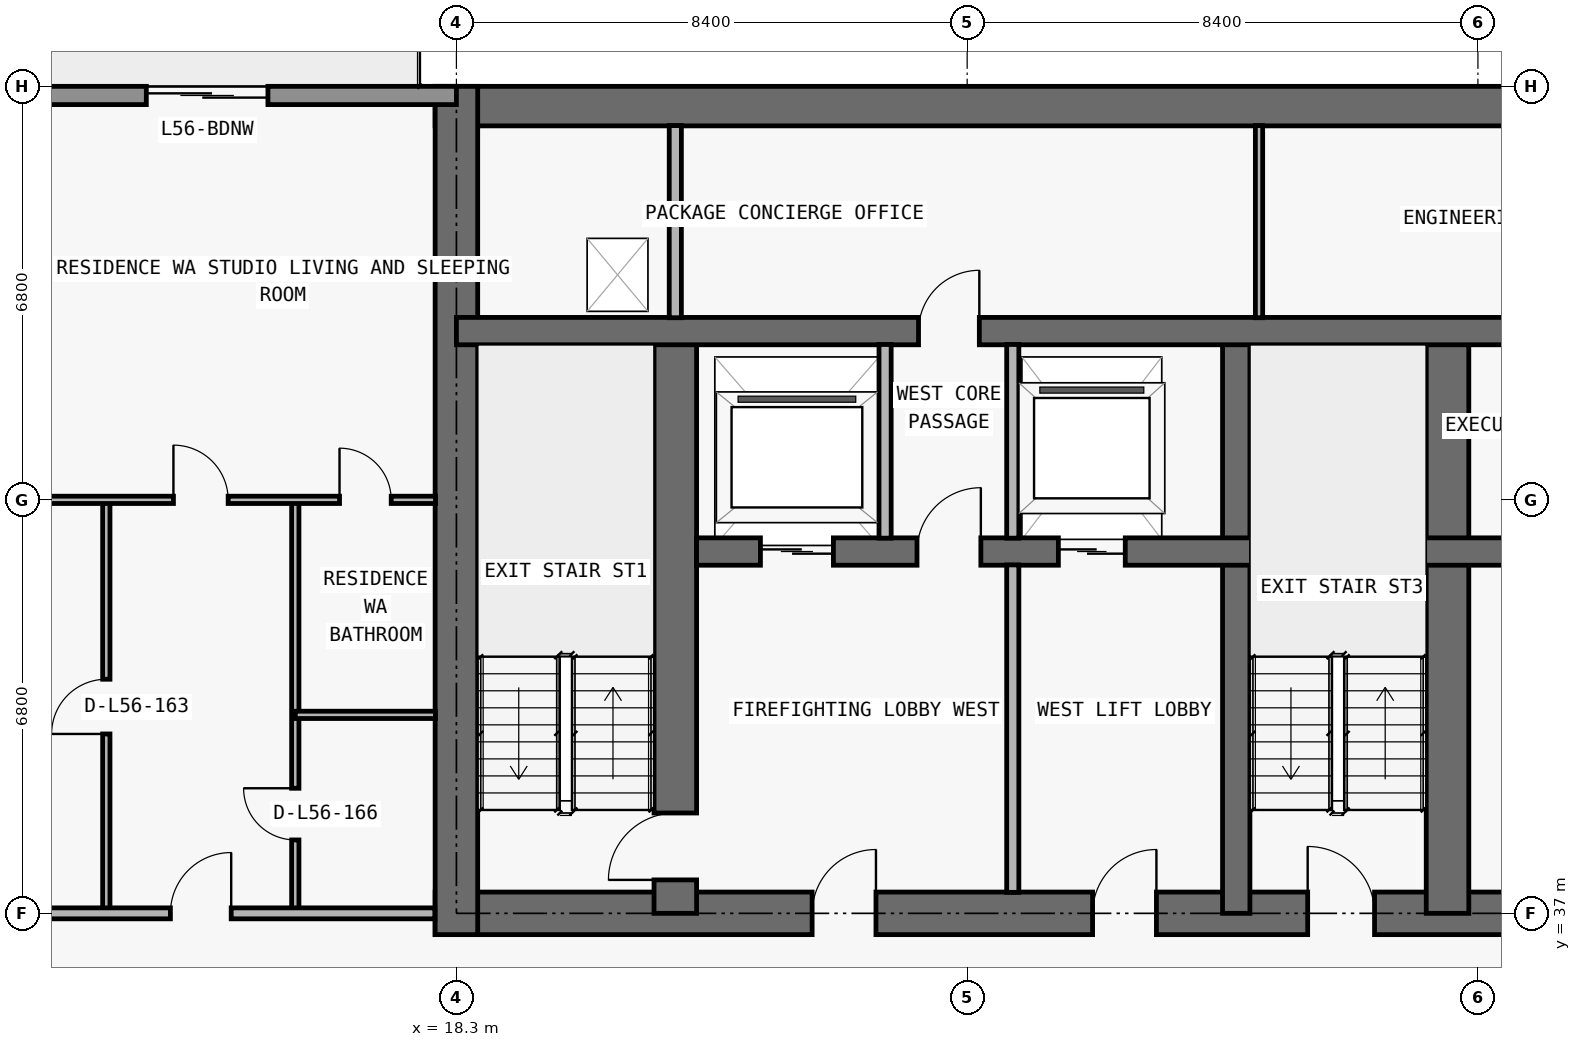
"""IFC4 building model, lengths in metres.
Left out: names, types, materials, properties, quantities, classifications, styles, units other than length and angle.
Written with IfcOpenShell. Run it as: python <this file> out.ifc"""

import sys

from ifc_helpers import new_model, si_unit, direction, frame, frame_2d, origin, place, context, subcontext, project, spatial, rectangle, extrude, element, fill, save


model = new_model("IFC4")
c1 = context("Model", 3, precision=1e-05, world=origin(), true_north=direction((0.0, 1.0)))
c2 = subcontext(c1, "Body", "Model", "MODEL_VIEW")
j1 = project(units=[si_unit("LENGTHUNIT", "METRE"), si_unit("PLANEANGLEUNIT", "RADIAN")], contexts=[c1])
p1 = place(None, origin())
s1 = spatial("IfcSite", under=j1, at=p1, CompositionType="ELEMENT")
p2 = place(p1, origin())
s2 = spatial("IfcBuilding", under=s1, at=p2, CompositionType="ELEMENT")
p3 = place(p2, frame((0.0, 0.0, 201.6)))
s3 = spatial("IfcBuildingStorey", under=s2, at=p3, CompositionType="ELEMENT", Elevation=201.6)
p4 = place(p3, frame((17.95, 37.0, 0.0), z_axis=(0.0, 0.0, 1.0), x_axis=(1.0, 0.0, 0.0)))
e1 = element("IfcWall", 1, at=p4, inside=s3, PredefinedType="SHEAR", context=c2, shape_type="SweptSolid", body=[
    extrude(rectangle(XDim=41.9, YDim=0.7, at=frame_2d((20.95, 0.0))), origin(), (0.0, 0.0, 1.0), 3.05),
])
p5 = place(p4, frame((14.35, 0.0, 0.0)))
e2 = element("IfcOpeningElement", 2, at=p5, cuts=e1, PredefinedType="OPENING", context=c2, shape_type="SweptSolid", body=[
    extrude(rectangle(XDim=1.1, YDim=2.15, at=frame_2d((0.55, 1.075))), frame((0.0, 0.36, 0.0), z_axis=(0.0, -1.0, 0.0), x_axis=(1.0, 0.0, 0.0)), (0.0, 0.0, 1.0), 0.72),
])
p6 = place(p4, frame((6.2, 0.0, 0.0)))
e3 = element("IfcOpeningElement", 3, at=p6, cuts=e1, PredefinedType="OPENING", context=c2, shape_type="SweptSolid", body=[
    extrude(rectangle(XDim=1.05, YDim=2.15, at=frame_2d((0.525, 1.075))), frame((0.0, 0.36, 0.0), z_axis=(0.0, -1.0, 0.0), x_axis=(1.0, 0.0, 0.0)), (0.0, 0.0, 1.0), 0.72),
])
p7 = place(p4, frame((34.7, 0.0, 0.0)))
e4 = element("IfcOpeningElement", 4, at=p7, cuts=e1, PredefinedType="OPENING", context=c2, shape_type="SweptSolid", body=[
    extrude(rectangle(XDim=1.05, YDim=2.15, at=frame_2d((0.525, 1.075))), frame((0.0, 0.36, 0.0), z_axis=(0.0, -1.0, 0.0), x_axis=(1.0, 0.0, 0.0)), (0.0, 0.0, 1.0), 0.72),
])
p8 = place(p4, frame((10.812, 0.0, 0.0)))
e5 = element("IfcOpeningElement", 5, at=p8, cuts=e1, PredefinedType="OPENING", context=c2, shape_type="SweptSolid", body=[
    extrude(rectangle(XDim=1.05, YDim=2.15, at=frame_2d((0.525, 1.075))), frame((0.0, 0.36, 0.0), z_axis=(0.0, -1.0, 0.0), x_axis=(1.0, 0.0, 0.0)), (0.0, 0.0, 1.0), 0.72),
])
p9 = place(p4, frame((24.05, 0.0, 0.0)))
e6 = element("IfcOpeningElement", 6, at=p9, cuts=e1, PredefinedType="OPENING", context=c2, shape_type="SweptSolid", body=[
    extrude(rectangle(XDim=1.05, YDim=2.15, at=frame_2d((0.525, 1.075))), frame((0.0, 0.36, 0.0), z_axis=(0.0, -1.0, 0.0), x_axis=(1.0, 0.0, 0.0)), (0.0, 0.0, 1.0), 0.72),
])
p10 = place(p3, frame((17.95, 50.275, 0.0), z_axis=(0.0, 0.0, 1.0), x_axis=(1.0, 0.0, 0.0)))
e7 = element("IfcWall", 7, at=p10, inside=s3, PredefinedType="SHEAR", context=c2, shape_type="SweptSolid", body=[
    extrude(rectangle(XDim=41.9, YDim=0.65, at=frame_2d((20.95, 0.0))), origin(), (0.0, 0.0, 1.0), 3.05),
])
p11 = place(p3, frame((18.3, 36.65, 0.0), z_axis=(0.0, 0.0, 1.0), x_axis=(0.0, 1.0, 0.0)))
e8 = element("IfcWall", 8, at=p11, inside=s3, PredefinedType="SHEAR", context=c2, shape_type="SweptSolid", body=[
    extrude(rectangle(XDim=13.95, YDim=0.7, at=frame_2d((6.975, 0.0))), origin(), (0.0, 0.0, 1.0), 3.05),
])
p12 = place(p3, frame((21.9, 37.0, 0.0), z_axis=(0.0, 0.0, 1.0), x_axis=(0.0, 1.0, 0.0)))
e9 = element("IfcWall", 9, at=p12, inside=s3, PredefinedType="SHEAR", context=c2, shape_type="SweptSolid", body=[
    extrude(rectangle(XDim=9.575, YDim=0.7, at=frame_2d((4.788, 0.0))), origin(), (0.0, 0.0, 1.0), 3.05),
])
p13 = place(p12, frame((0.55, 0.0, 0.0)))
e10 = element("IfcOpeningElement", 10, at=p13, cuts=e9, PredefinedType="OPENING", context=c2, shape_type="SweptSolid", body=[
    extrude(rectangle(XDim=1.1, YDim=2.15, at=frame_2d((0.55, 1.075))), frame((0.0, 0.36, 0.0), z_axis=(0.0, -1.0, 0.0), x_axis=(1.0, 0.0, 0.0)), (0.0, 0.0, 1.0), 0.72),
])
p14 = place(p3, frame((31.125, 37.0, 0.0), z_axis=(0.0, 0.0, 1.0), x_axis=(0.0, 1.0, 0.0)))
e11 = element("IfcWall", 11, at=p14, inside=s3, PredefinedType="SHEAR", context=c2, shape_type="SweptSolid", body=[
    extrude(rectangle(XDim=9.575, YDim=0.45, at=frame_2d((4.788, 0.0))), origin(), (0.0, 0.0, 1.0), 3.05),
])
p15 = place(p3, frame((34.6, 37.0, 0.0), z_axis=(0.0, 0.0, 1.0), x_axis=(0.0, 1.0, 0.0)))
e12 = element("IfcWall", 12, at=p15, inside=s3, PredefinedType="SHEAR", context=c2, shape_type="SweptSolid", body=[
    extrude(rectangle(XDim=9.575, YDim=0.7, at=frame_2d((4.788, 0.0))), origin(), (0.0, 0.0, 1.0), 3.05),
])
p16 = place(p3, frame((22.25, 42.95, 0.0), z_axis=(0.0, 0.0, 1.0), x_axis=(1.0, 0.0, 0.0)))
e13 = element("IfcWall", 13, at=p16, inside=s3, PredefinedType="SHEAR", context=c2, shape_type="SweptSolid", body=[
    extrude(rectangle(XDim=33.3, YDim=0.45, at=frame_2d((16.65, 0.0))), origin(), (0.0, 0.0, 1.0), 3.05),
])
p17 = place(p16, frame((1.05, 0.0, 0.0)))
e14 = element("IfcOpeningElement", 14, at=p17, cuts=e13, PredefinedType="OPENING", context=c2, shape_type="SweptSolid", body=[
    extrude(rectangle(XDim=1.2, YDim=2.2, at=frame_2d((0.6, 1.1))), frame((0.0, 0.235, 0.0), z_axis=(0.0, -1.0, 0.0), x_axis=(1.0, 0.0, 0.0)), (0.0, 0.0, 1.0), 0.47),
])
p18 = place(p16, frame((31.05, 0.0, 0.0)))
e15 = element("IfcOpeningElement", 15, at=p18, cuts=e13, PredefinedType="OPENING", context=c2, shape_type="SweptSolid", body=[
    extrude(rectangle(XDim=1.2, YDim=2.2, at=frame_2d((0.6, 1.1))), frame((0.0, 0.235, 0.0), z_axis=(0.0, -1.0, 0.0), x_axis=(1.0, 0.0, 0.0)), (0.0, 0.0, 1.0), 0.47),
])
p19 = place(p16, frame((26.45, 0.0, 0.0)))
e16 = element("IfcOpeningElement", 16, at=p19, cuts=e13, PredefinedType="OPENING", context=c2, shape_type="SweptSolid", body=[
    extrude(rectangle(XDim=1.1, YDim=2.2, at=frame_2d((0.55, 1.1))), frame((0.0, 0.235, 0.0), z_axis=(0.0, -1.0, 0.0), x_axis=(1.0, 0.0, 0.0)), (0.0, 0.0, 1.0), 0.47),
])
p20 = place(p16, frame((5.95, 0.0, 0.0)))
e17 = element("IfcOpeningElement", 17, at=p20, cuts=e13, PredefinedType="OPENING", context=c2, shape_type="SweptSolid", body=[
    extrude(rectangle(XDim=1.1, YDim=2.2, at=frame_2d((0.55, 1.1))), frame((0.0, 0.235, 0.0), z_axis=(0.0, -1.0, 0.0), x_axis=(1.0, 0.0, 0.0)), (0.0, 0.0, 1.0), 0.47),
])
p21 = place(p16, frame((3.625, 0.0, 0.0)))
e18 = element("IfcOpeningElement", 18, at=p21, cuts=e13, PredefinedType="OPENING", context=c2, shape_type="SweptSolid", body=[
    extrude(rectangle(XDim=1.05, YDim=2.15, at=frame_2d((0.525, 1.075))), frame((0.0, 0.235, 0.0), z_axis=(0.0, -1.0, 0.0), x_axis=(1.0, 0.0, 0.0)), (0.0, 0.0, 1.0), 0.47),
])
p22 = place(p16, frame((28.675, 0.0, 0.0)))
e19 = element("IfcOpeningElement", 19, at=p22, cuts=e13, PredefinedType="OPENING", context=c2, shape_type="SweptSolid", body=[
    extrude(rectangle(XDim=1.05, YDim=2.15, at=frame_2d((0.525, 1.075))), frame((0.0, 0.235, 0.0), z_axis=(0.0, -1.0, 0.0), x_axis=(1.0, 0.0, 0.0)), (0.0, 0.0, 1.0), 0.47),
])
p23 = place(p16, frame((14.7, 0.0, 0.0)))
e20 = element("IfcOpeningElement", 20, at=p23, cuts=e13, PredefinedType="OPENING", context=c2, shape_type="SweptSolid", body=[
    extrude(rectangle(XDim=1.0, YDim=2.2, at=frame_2d((0.5, 1.1))), frame((0.0, 0.235, 0.0), z_axis=(0.0, -1.0, 0.0), x_axis=(1.0, 0.0, 0.0)), (0.0, 0.0, 1.0), 0.47),
])
p24 = place(p16, frame((21.45, 0.0, 0.0)))
e21 = element("IfcOpeningElement", 21, at=p24, cuts=e13, PredefinedType="OPENING", context=c2, shape_type="SweptSolid", body=[
    extrude(rectangle(XDim=1.0, YDim=2.2, at=frame_2d((0.5, 1.1))), frame((0.0, 0.235, 0.0), z_axis=(0.0, -1.0, 0.0), x_axis=(1.0, 0.0, 0.0)), (0.0, 0.0, 1.0), 0.47),
])
p25 = place(p3, frame((18.3, 46.575, 0.0), z_axis=(0.0, 0.0, 1.0), x_axis=(1.0, 0.0, 0.0)))
e22 = element("IfcWall", 22, at=p25, inside=s3, PredefinedType="SHEAR", context=c2, shape_type="SweptSolid", body=[
    extrude(rectangle(XDim=41.2, YDim=0.45, at=frame_2d((20.6, 0.0))), origin(), (0.0, 0.0, 1.0), 3.05),
])
p26 = place(p25, frame((7.6, 0.0, 0.0)))
e23 = element("IfcOpeningElement", 23, at=p26, cuts=e22, PredefinedType="OPENING", context=c2, shape_type="SweptSolid", body=[
    extrude(rectangle(XDim=1.0, YDim=2.2, at=frame_2d((0.5, 1.1))), frame((0.0, 0.235, 0.0), z_axis=(0.0, -1.0, 0.0), x_axis=(1.0, 0.0, 0.0)), (0.0, 0.0, 1.0), 0.47),
])
p27 = place(p25, frame((32.625, 0.0, 0.0)))
e24 = element("IfcOpeningElement", 24, at=p27, cuts=e22, PredefinedType="OPENING", context=c2, shape_type="SweptSolid", body=[
    extrude(rectangle(XDim=1.05, YDim=2.15, at=frame_2d((0.525, 1.075))), frame((0.0, 0.235, 0.0), z_axis=(0.0, -1.0, 0.0), x_axis=(1.0, 0.0, 0.0)), (0.0, 0.0, 1.0), 0.47),
])
p28 = place(p3, frame((10.1, 50.45, 0.0), z_axis=(0.0, 0.0, 1.0), x_axis=(1.0, 0.0, 0.0)))
e25 = element("IfcWall", 25, at=p28, inside=s3, PredefinedType="STANDARD", context=c2, shape_type="SweptSolid", body=[
    extrude(rectangle(XDim=8.2, YDim=0.3, at=frame_2d((4.1, 0.0))), origin(), (0.0, 0.0, 1.0), 3.05),
])
p29 = place(p28, frame((3.1, 0.0, 0.0)))
e26 = element("IfcOpeningElement", 26, at=p29, cuts=e25, PredefinedType="OPENING", context=c2, shape_type="SweptSolid", body=[
    extrude(rectangle(XDim=2.0, YDim=2.3, at=frame_2d((1.0, 1.15))), frame((0.0, 0.16, 0.0), z_axis=(0.0, -1.0, 0.0), x_axis=(1.0, 0.0, 0.0)), (0.0, 0.0, 1.0), 0.32),
])
p30 = place(p3, frame((12.542, 37.0, 0.0), z_axis=(0.0, 0.0, 1.0), x_axis=(0.0, 1.0, 0.0)))
e27 = element("IfcWall", 27, at=p30, inside=s3, PredefinedType="PARTITIONING", context=c2, shape_type="SweptSolid", body=[
    extrude(rectangle(XDim=6.8, YDim=0.12, at=frame_2d((3.4, 0.0))), origin(), (0.0, 0.0, 1.0), 2.578),
])
p31 = place(p30, frame((2.95, 0.0, 0.0)))
e28 = element("IfcOpeningElement", 28, at=p31, cuts=e27, PredefinedType="OPENING", context=c2, shape_type="SweptSolid", body=[
    extrude(rectangle(XDim=0.9, YDim=2.15, at=frame_2d((0.45, 1.075))), frame((0.0, 0.07, 0.0), z_axis=(0.0, -1.0, 0.0), x_axis=(1.0, 0.0, 0.0)), (0.0, 0.0, 1.0), 0.14),
])
p32 = place(p3, frame((15.65, 37.0, 0.0), z_axis=(0.0, 0.0, 1.0), x_axis=(0.0, 1.0, 0.0)))
e29 = element("IfcWall", 29, at=p32, inside=s3, PredefinedType="PARTITIONING", context=c2, shape_type="SweptSolid", body=[
    extrude(rectangle(XDim=6.8, YDim=0.12, at=frame_2d((3.4, 0.0))), origin(), (0.0, 0.0, 1.0), 2.679),
])
p33 = place(p32, frame((1.207, 0.0, 0.0)))
e30 = element("IfcOpeningElement", 30, at=p33, cuts=e29, PredefinedType="OPENING", context=c2, shape_type="SweptSolid", body=[
    extrude(rectangle(XDim=0.85, YDim=2.1, at=frame_2d((0.425, 1.05))), frame((0.0, 0.07, 0.0), z_axis=(0.0, -1.0, 0.0), x_axis=(1.0, 0.0, 0.0)), (0.0, 0.0, 1.0), 0.14),
])
p34 = place(p3, frame((21.9, 46.795, 0.0), z_axis=(0.0, 0.0, 1.0), x_axis=(0.0, 1.0, 0.0)))
e31 = element("IfcWall", 31, at=p34, inside=s3, PredefinedType="PARTITIONING", context=c2, shape_type="SweptSolid", body=[
    extrude(rectangle(XDim=3.16, YDim=0.2, at=frame_2d((1.58, 0.0))), origin(), (0.0, 0.0, 1.0), 3.05),
])
p35 = place(p3, frame((25.35, 43.17, 0.0), z_axis=(0.0, 0.0, 1.0), x_axis=(0.0, 1.0, 0.0)))
e32 = element("IfcWall", 32, at=p35, inside=s3, PredefinedType="PARTITIONING", context=c2, shape_type="SweptSolid", body=[
    extrude(rectangle(XDim=3.185, YDim=0.2, at=frame_2d((1.593, 0.0))), origin(), (0.0, 0.0, 1.0), 3.05),
])
p36 = place(p3, frame((27.45, 37.345, 0.0), z_axis=(0.0, 0.0, 1.0), x_axis=(0.0, 1.0, 0.0)))
e33 = element("IfcWall", 33, at=p36, inside=s3, PredefinedType="PARTITIONING", context=c2, shape_type="SweptSolid", body=[
    extrude(rectangle(XDim=5.385, YDim=0.2, at=frame_2d((2.692, 0.0))), origin(), (0.0, 0.0, 1.0), 3.05),
])
p37 = place(p3, frame((27.45, 43.17, 0.0), z_axis=(0.0, 0.0, 1.0), x_axis=(0.0, 1.0, 0.0)))
e34 = element("IfcWall", 34, at=p37, inside=s3, PredefinedType="PARTITIONING", context=c2, shape_type="SweptSolid", body=[
    extrude(rectangle(XDim=3.185, YDim=0.2, at=frame_2d((1.593, 0.0))), origin(), (0.0, 0.0, 1.0), 3.05),
])
p38 = place(p3, frame((31.5, 46.795, 0.0), z_axis=(0.0, 0.0, 1.0), x_axis=(0.0, 1.0, 0.0)))
e35 = element("IfcWall", 35, at=p38, inside=s3, PredefinedType="PARTITIONING", context=c2, shape_type="SweptSolid", body=[
    extrude(rectangle(XDim=3.16, YDim=0.12, at=frame_2d((1.58, 0.0))), origin(), (0.0, 0.0, 1.0), 3.05),
])
p39 = place(p3, frame((10.1, 37.0, 0.0), z_axis=(0.0, 0.0, 1.0), x_axis=(1.0, 0.0, 0.0)))
e36 = element("IfcWall", 36, at=p39, inside=s3, PredefinedType="PARTITIONING", context=c2, shape_type="SweptSolid", body=[
    extrude(rectangle(XDim=7.845, YDim=0.18, at=frame_2d((3.922, 0.0))), origin(), (0.0, 0.0, 1.0), 3.05),
])
p40 = place(p39, frame((3.496, 0.0, 0.0)))
e37 = element("IfcOpeningElement", 37, at=p40, cuts=e36, PredefinedType="OPENING", context=c2, shape_type="SweptSolid", body=[
    extrude(rectangle(XDim=1.0, YDim=2.2, at=frame_2d((0.5, 1.1))), frame((0.0, 0.1, 0.0), z_axis=(0.0, -1.0, 0.0), x_axis=(1.0, 0.0, 0.0)), (0.0, 0.0, 1.0), 0.2),
])
p41 = place(p3, frame((15.65, 40.264, 0.0), z_axis=(0.0, 0.0, 1.0), x_axis=(1.0, 0.0, 0.0)))
e38 = element("IfcWall", 38, at=p41, inside=s3, PredefinedType="PARTITIONING", context=c2, shape_type="SweptSolid", body=[
    extrude(rectangle(XDim=2.305, YDim=0.12, at=frame_2d((1.153, 0.0))), origin(), (0.0, 0.0, 1.0), 3.05),
])
p42 = place(p3, frame((6.395, 43.8, 0.0), z_axis=(0.0, 0.0, 1.0), x_axis=(1.0, 0.0, 0.0)))
e39 = element("IfcWall", 39, at=p42, inside=s3, PredefinedType="PARTITIONING", context=c2, shape_type="SweptSolid", body=[
    extrude(rectangle(XDim=11.56, YDim=0.12, at=frame_2d((5.78, 0.0))), origin(), (0.0, 0.0, 1.0), 2.418),
])
p43 = place(p42, frame((7.251, 0.0, 0.0)))
e40 = element("IfcOpeningElement", 40, at=p43, cuts=e39, PredefinedType="OPENING", context=c2, shape_type="SweptSolid", body=[
    extrude(rectangle(XDim=0.9, YDim=2.15, at=frame_2d((0.45, 1.075))), frame((0.0, 0.07, 0.0), z_axis=(0.0, -1.0, 0.0), x_axis=(1.0, 0.0, 0.0)), (0.0, 0.0, 1.0), 0.14),
])
p44 = place(p42, frame((9.982, 0.0, 0.0)))
e41 = element("IfcOpeningElement", 41, at=p44, cuts=e39, PredefinedType="OPENING", context=c2, shape_type="SweptSolid", body=[
    extrude(rectangle(XDim=0.85, YDim=2.1, at=frame_2d((0.425, 1.05))), frame((0.0, 0.07, 0.0), z_axis=(0.0, -1.0, 0.0), x_axis=(1.0, 0.0, 0.0)), (0.0, 0.0, 1.0), 0.14),
])
p45 = place(p29, origin())
e42 = element("IfcDoor", 42, at=p45, inside=s3, OperationType="DOUBLE_DOOR_SLIDING", PredefinedType="DOOR", context=c2, shape_type="SweptSolid", body=[
    extrude(rectangle(XDim=2.0, YDim=2.3, at=frame_2d((1.0, 1.15))), frame((0.0, 0.025, 0.0), z_axis=(0.0, -1.0, 0.0), x_axis=(1.0, 0.0, 0.0)), (0.0, 0.0, 1.0), 0.05),
])
fill(e26, e42)
p46 = place(p17, origin())
e43 = element("IfcDoor", 43, at=p46, inside=s3, OperationType="DOUBLE_DOOR_SLIDING", PredefinedType="DOOR", context=c2, shape_type="SweptSolid", body=[
    extrude(rectangle(XDim=1.2, YDim=2.2, at=frame_2d((0.6, 1.1))), frame((0.0, 0.025, 0.0), z_axis=(0.0, -1.0, 0.0), x_axis=(1.0, 0.0, 0.0)), (0.0, 0.0, 1.0), 0.05),
])
fill(e14, e43)
p47 = place(p20, origin())
e44 = element("IfcDoor", 44, at=p47, inside=s3, OperationType="DOUBLE_DOOR_SLIDING", PredefinedType="DOOR", context=c2, shape_type="SweptSolid", body=[
    extrude(rectangle(XDim=1.1, YDim=2.2, at=frame_2d((0.55, 1.1))), frame((0.0, 0.025, 0.0), z_axis=(0.0, -1.0, 0.0), x_axis=(1.0, 0.0, 0.0)), (0.0, 0.0, 1.0), 0.05),
])
fill(e17, e44)
p48 = place(p5, origin())
e45 = element("IfcDoor", 45, at=p48, inside=s3, OperationType="SINGLE_SWING_LEFT", PredefinedType="DOOR", context=c2, shape_type="SweptSolid", body=[
    extrude(rectangle(XDim=1.1, YDim=2.15, at=frame_2d((0.55, 1.075))), frame((0.0, 0.025, 0.0), z_axis=(0.0, -1.0, 0.0), x_axis=(1.0, 0.0, 0.0)), (0.0, 0.0, 1.0), 0.05),
])
fill(e2, e45)
p49 = place(p6, origin())
e46 = element("IfcDoor", 46, at=p49, inside=s3, OperationType="SINGLE_SWING_RIGHT", PredefinedType="DOOR", context=c2, shape_type="SweptSolid", body=[
    extrude(rectangle(XDim=1.05, YDim=2.15, at=frame_2d((0.525, 1.075))), frame((0.0, 0.025, 0.0), z_axis=(0.0, -1.0, 0.0), x_axis=(1.0, 0.0, 0.0)), (0.0, 0.0, 1.0), 0.05),
])
fill(e3, e46)
p50 = place(p13, origin())
e47 = element("IfcDoor", 47, at=p50, inside=s3, OperationType="SINGLE_SWING_LEFT", PredefinedType="DOOR", context=c2, shape_type="SweptSolid", body=[
    extrude(rectangle(XDim=1.1, YDim=2.15, at=frame_2d((0.55, 1.075))), frame((0.0, 0.025, 0.0), z_axis=(0.0, -1.0, 0.0), x_axis=(1.0, 0.0, 0.0)), (0.0, 0.0, 1.0), 0.05),
])
fill(e10, e47)
p51 = place(p21, origin())
e48 = element("IfcDoor", 48, at=p51, inside=s3, OperationType="SINGLE_SWING_RIGHT", PredefinedType="DOOR", context=c2, shape_type="SweptSolid", body=[
    extrude(rectangle(XDim=1.05, YDim=2.15, at=frame_2d((0.525, 1.075))), frame((0.0, 0.025, 0.0), z_axis=(0.0, -1.0, 0.0), x_axis=(1.0, 0.0, 0.0)), (0.0, 0.0, 1.0), 0.05),
])
fill(e18, e48)
p52 = place(p8, origin())
e49 = element("IfcDoor", 49, at=p52, inside=s3, OperationType="SINGLE_SWING_RIGHT", PredefinedType="DOOR", context=c2, shape_type="SweptSolid", body=[
    extrude(rectangle(XDim=1.05, YDim=2.15, at=frame_2d((0.525, 1.075))), frame((0.0, 0.025, 0.0), z_axis=(0.0, -1.0, 0.0), x_axis=(1.0, 0.0, 0.0)), (0.0, 0.0, 1.0), 0.05),
])
fill(e5, e49)
p53 = place(p26, origin())
e50 = element("IfcDoor", 50, at=p53, inside=s3, OperationType="SINGLE_SWING_RIGHT", PredefinedType="DOOR", context=c2, shape_type="SweptSolid", body=[
    extrude(rectangle(XDim=1.0, YDim=2.2, at=frame_2d((0.5, 1.1))), frame((0.0, 0.025, 0.0), z_axis=(0.0, -1.0, 0.0), x_axis=(1.0, 0.0, 0.0)), (0.0, 0.0, 1.0), 0.05),
])
fill(e23, e50)
p54 = place(p31, origin())
e51 = element("IfcDoor", 51, at=p54, inside=s3, OperationType="SINGLE_SWING_LEFT", PredefinedType="DOOR", context=c2, shape_type="SweptSolid", body=[
    extrude(rectangle(XDim=0.9, YDim=2.15, at=frame_2d((0.45, 1.075))), frame((0.0, 0.025, 0.0), z_axis=(0.0, -1.0, 0.0), x_axis=(1.0, 0.0, 0.0)), (0.0, 0.0, 1.0), 0.05),
])
fill(e28, e51)
p55 = place(p40, origin())
e52 = element("IfcDoor", 52, at=p55, inside=s3, OperationType="SINGLE_SWING_RIGHT", PredefinedType="DOOR", context=c2, shape_type="SweptSolid", body=[
    extrude(rectangle(XDim=1.0, YDim=2.2, at=frame_2d((0.5, 1.1))), frame((0.0, 0.025, 0.0), z_axis=(0.0, -1.0, 0.0), x_axis=(1.0, 0.0, 0.0)), (0.0, 0.0, 1.0), 0.05),
])
fill(e37, e52)
p56 = place(p43, origin())
e53 = element("IfcDoor", 53, at=p56, inside=s3, OperationType="SINGLE_SWING_LEFT", PredefinedType="DOOR", context=c2, shape_type="SweptSolid", body=[
    extrude(rectangle(XDim=0.9, YDim=2.15, at=frame_2d((0.45, 1.075))), frame((0.0, 0.025, 0.0), z_axis=(0.0, -1.0, 0.0), x_axis=(1.0, 0.0, 0.0)), (0.0, 0.0, 1.0), 0.05),
])
fill(e40, e53)
p57 = place(p33, origin())
e54 = element("IfcDoor", 54, at=p57, inside=s3, OperationType="SINGLE_SWING_RIGHT", PredefinedType="DOOR", context=c2, shape_type="SweptSolid", body=[
    extrude(rectangle(XDim=0.85, YDim=2.1, at=frame_2d((0.425, 1.05))), frame((0.0, 0.025, 0.0), z_axis=(0.0, -1.0, 0.0), x_axis=(1.0, 0.0, 0.0)), (0.0, 0.0, 1.0), 0.05),
])
fill(e30, e54)
p58 = place(p44, origin())
e55 = element("IfcDoor", 55, at=p58, inside=s3, OperationType="SINGLE_SWING_LEFT", PredefinedType="DOOR", context=c2, shape_type="SweptSolid", body=[
    extrude(rectangle(XDim=0.85, YDim=2.1, at=frame_2d((0.425, 1.05))), frame((0.0, 0.025, 0.0), z_axis=(0.0, -1.0, 0.0), x_axis=(1.0, 0.0, 0.0)), (0.0, 0.0, 1.0), 0.05),
])
fill(e41, e55)
save(model, sys.argv[1])
